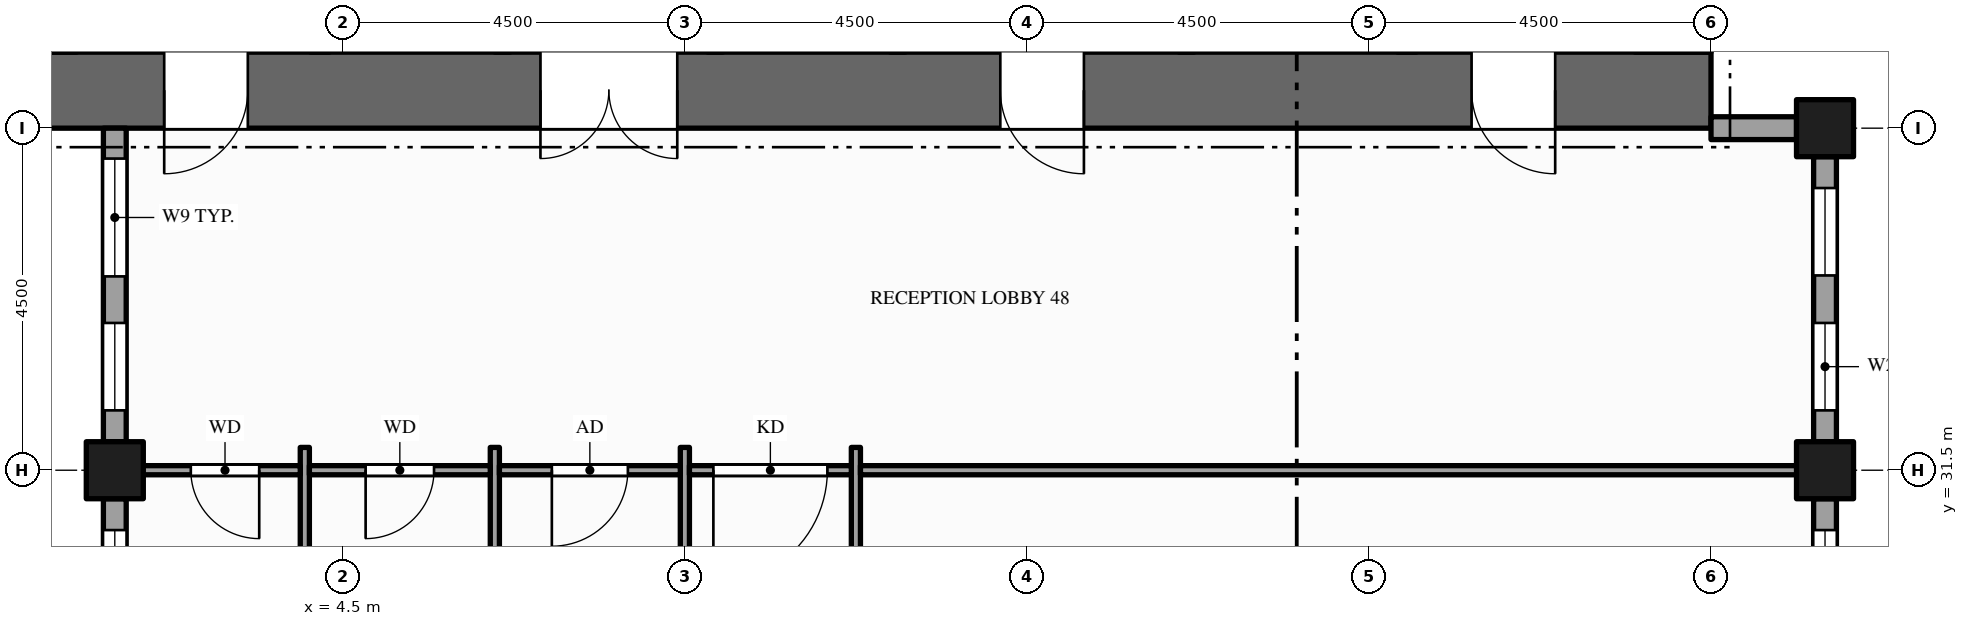
"""IFC4 building model, lengths in metres.
Left out: names, types, materials, properties, quantities, classifications, styles, units other than length and angle.
Written with IfcOpenShell. Run it as: python <this file> out.ifc"""

import sys

from ifc_helpers import new_model, si_unit, direction, frame, frame_2d, origin, origin_2d, place, context, subcontext, project, spatial, rectangle, hollow_rectangle, extrude, element, fill, save


model = new_model("IFC4")
c1 = context("Model", 3, precision=1e-05, world=origin(), true_north=direction((0.0, 1.0)))
c2 = subcontext(c1, "Body", "Model", "MODEL_VIEW")
j1 = project(units=[si_unit("LENGTHUNIT", "METRE"), si_unit("PLANEANGLEUNIT", "RADIAN")], contexts=[c1])
p1 = place(None, origin())
s1 = spatial("IfcSite", under=j1, at=p1, CompositionType="ELEMENT")
p2 = place(p1, origin())
s2 = spatial("IfcBuilding", under=s1, at=p2, CompositionType="ELEMENT")
p3 = place(p2, frame((0.0, 0.0, 195.0)))
s3 = spatial("IfcBuildingStorey", under=s2, at=p3, CompositionType="ELEMENT", Elevation=195.0)
p4 = place(p3, frame((0.0, 36.5, -0.15), z_axis=(0.0, 0.0, 1.0), x_axis=(1.0, 0.0, 0.0)))
e1 = element("IfcWall", 1, at=p4, inside=s3, PredefinedType="SHEAR", context=c2, shape_type="SweptSolid", body=[
    extrude(rectangle(XDim=22.5, YDim=1.0, at=frame_2d((11.25, 0.0))), origin(), (0.0, 0.0, 1.0), 4.0),
])
p5 = place(p4, frame((7.1, 0.0, 0.15)))
e2 = element("IfcOpeningElement", 2, at=p5, cuts=e1, PredefinedType="OPENING", context=c2, shape_type="SweptSolid", body=[
    extrude(rectangle(XDim=1.8, YDim=2.1, at=frame_2d((0.9, 1.05))), frame((0.0, 0.51, 0.0), z_axis=(0.0, -1.0, 0.0), x_axis=(1.0, 0.0, 0.0)), (0.0, 0.0, 1.0), 1.02),
])
p6 = place(p4, frame((13.15, 0.0, 0.15)))
e3 = element("IfcOpeningElement", 3, at=p6, cuts=e1, PredefinedType="OPENING", context=c2, shape_type="SweptSolid", body=[
    extrude(rectangle(XDim=1.1, YDim=2.1, at=frame_2d((0.55, 1.05))), frame((0.0, 0.51, 0.0), z_axis=(0.0, -1.0, 0.0), x_axis=(1.0, 0.0, 0.0)), (0.0, 0.0, 1.0), 1.02),
])
p7 = place(p4, frame((2.15, 0.0, 0.15)))
e4 = element("IfcOpeningElement", 4, at=p7, cuts=e1, PredefinedType="OPENING", context=c2, shape_type="SweptSolid", body=[
    extrude(rectangle(XDim=1.1, YDim=2.1, at=frame_2d((0.55, 1.05))), frame((0.0, 0.51, 0.0), z_axis=(0.0, -1.0, 0.0), x_axis=(1.0, 0.0, 0.0)), (0.0, 0.0, 1.0), 1.02),
])
p8 = place(p4, frame((19.35, 0.0, 0.15)))
e5 = element("IfcOpeningElement", 5, at=p8, cuts=e1, PredefinedType="OPENING", context=c2, shape_type="SweptSolid", body=[
    extrude(rectangle(XDim=1.1, YDim=2.1, at=frame_2d((0.55, 1.05))), frame((0.0, 0.51, 0.0), z_axis=(0.0, -1.0, 0.0), x_axis=(1.0, 0.0, 0.0)), (0.0, 0.0, 1.0), 1.02),
])
for number, where, z_axis, x_axis in (
    (6, (1.5, 31.5, -0.15), (0.0, 0.0, 1.0), (1.0, 0.0, 0.0)),
    (7, (24.0, 31.5, -0.15), (0.0, 0.0, 1.0), (1.0, 0.0, 0.0)),
    (8, (24.0, 36.0, -0.15), (0.0, 0.0, 1.0), (1.0, 0.0, 0.0)),
):
    element("IfcColumn", number, at=place(p3, frame(where, z_axis=z_axis, x_axis=x_axis)), inside=s3, PredefinedType="COLUMN", context=c2, shape_type="SweptSolid", body=[
        extrude(hollow_rectangle(XDim=0.75, YDim=0.75, WallThickness=0.036, at=origin_2d()), origin(), (0.0, 0.0, 1.0), 4.0),
    ])
p9 = place(p3, frame((24.0, 25.875, 0.0), z_axis=(0.0, 0.0, 1.0), x_axis=(0.0, 1.0, 0.0)))
e9 = element("IfcWall", 9, at=p9, inside=s3, PredefinedType="STANDARD", context=c2, shape_type="SweptSolid", body=[
    extrude(rectangle(XDim=5.25, YDim=0.3, at=frame_2d((2.625, 0.0))), origin(), (0.0, 0.0, 1.0), 3.157),
])
p10 = place(p9, frame((1.425, 0.0, 0.9)))
e10 = element("IfcOpeningElement", 10, at=p10, cuts=e9, PredefinedType="OPENING", context=c2, shape_type="SweptSolid", body=[
    extrude(rectangle(XDim=1.65, YDim=2.0, at=frame_2d((0.825, 1.0))), frame((0.0, 0.16, 0.0), z_axis=(0.0, -1.0, 0.0), x_axis=(1.0, 0.0, 0.0)), (0.0, 0.0, 1.0), 0.32),
])
p11 = place(p9, frame((3.688, 0.0, 0.9)))
e11 = element("IfcOpeningElement", 11, at=p11, cuts=e9, PredefinedType="OPENING", context=c2, shape_type="SweptSolid", body=[
    extrude(rectangle(XDim=1.15, YDim=2.0, at=frame_2d((0.575, 1.0))), frame((0.0, 0.16, 0.0), z_axis=(0.0, -1.0, 0.0), x_axis=(1.0, 0.0, 0.0)), (0.0, 0.0, 1.0), 0.32),
])
p12 = place(p3, frame((24.0, 31.875, 0.0), z_axis=(0.0, 0.0, 1.0), x_axis=(0.0, 1.0, 0.0)))
e12 = element("IfcWall", 12, at=p12, inside=s3, PredefinedType="STANDARD", context=c2, shape_type="SweptSolid", body=[
    extrude(rectangle(XDim=3.75, YDim=0.3, at=frame_2d((1.875, 0.0))), origin(), (0.0, 0.0, 1.0), 3.157),
])
p13 = place(p12, frame((0.413, 0.0, 0.9)))
e13 = element("IfcOpeningElement", 13, at=p13, cuts=e12, PredefinedType="OPENING", context=c2, shape_type="SweptSolid", body=[
    extrude(rectangle(XDim=1.15, YDim=2.0, at=frame_2d((0.575, 1.0))), frame((0.0, 0.16, 0.0), z_axis=(0.0, -1.0, 0.0), x_axis=(1.0, 0.0, 0.0)), (0.0, 0.0, 1.0), 0.32),
])
p14 = place(p12, frame((2.188, 0.0, 0.9)))
e14 = element("IfcOpeningElement", 14, at=p14, cuts=e12, PredefinedType="OPENING", context=c2, shape_type="SweptSolid", body=[
    extrude(rectangle(XDim=1.15, YDim=2.0, at=frame_2d((0.575, 1.0))), frame((0.0, 0.16, 0.0), z_axis=(0.0, -1.0, 0.0), x_axis=(1.0, 0.0, 0.0)), (0.0, 0.0, 1.0), 0.32),
])
p15 = place(p3, frame((23.625, 36.0, 0.0), z_axis=(0.0, 0.0, 1.0), x_axis=(-1.0, 0.0, 0.0)))
e15 = element("IfcWall", 15, at=p15, inside=s3, PredefinedType="STANDARD", context=c2, shape_type="SweptSolid", body=[
    extrude(rectangle(XDim=1.125, YDim=0.3, at=frame_2d((0.562, 0.0))), origin(), (0.0, 0.0, 1.0), 2.87),
])
p16 = place(p3, frame((1.5, 36.0, 0.0), z_axis=(0.0, 0.0, 1.0), x_axis=(0.0, -1.0, 0.0)))
e16 = element("IfcWall", 16, at=p16, inside=s3, PredefinedType="STANDARD", context=c2, shape_type="SweptSolid", body=[
    extrude(rectangle(XDim=4.125, YDim=0.3, at=frame_2d((2.062, 0.0))), origin(), (0.0, 0.0, 1.0), 3.157),
])
p17 = place(p16, frame((0.4, 0.0, 0.9)))
e17 = element("IfcOpeningElement", 17, at=p17, cuts=e16, PredefinedType="OPENING", context=c2, shape_type="SweptSolid", body=[
    extrude(rectangle(XDim=1.55, YDim=2.0, at=frame_2d((0.775, 1.0))), frame((0.0, 0.16, 0.0), z_axis=(0.0, -1.0, 0.0), x_axis=(1.0, 0.0, 0.0)), (0.0, 0.0, 1.0), 0.32),
])
p18 = place(p16, frame((2.562, 0.0, 0.9)))
e18 = element("IfcOpeningElement", 18, at=p18, cuts=e16, PredefinedType="OPENING", context=c2, shape_type="SweptSolid", body=[
    extrude(rectangle(XDim=1.15, YDim=2.0, at=frame_2d((0.575, 1.0))), frame((0.0, 0.16, 0.0), z_axis=(0.0, -1.0, 0.0), x_axis=(1.0, 0.0, 0.0)), (0.0, 0.0, 1.0), 0.32),
])
p19 = place(p3, frame((1.5, 31.125, 0.0), z_axis=(0.0, 0.0, 1.0), x_axis=(0.0, -1.0, 0.0)))
e19 = element("IfcWall", 19, at=p19, inside=s3, PredefinedType="STANDARD", context=c2, shape_type="SweptSolid", body=[
    extrude(rectangle(XDim=3.75, YDim=0.3, at=frame_2d((1.875, 0.0))), origin(), (0.0, 0.0, 1.0), 3.157),
])
p20 = place(p19, frame((0.413, 0.0, 0.9)))
e20 = element("IfcOpeningElement", 20, at=p20, cuts=e19, PredefinedType="OPENING", context=c2, shape_type="SweptSolid", body=[
    extrude(rectangle(XDim=1.15, YDim=2.0, at=frame_2d((0.575, 1.0))), frame((0.0, 0.16, 0.0), z_axis=(0.0, -1.0, 0.0), x_axis=(1.0, 0.0, 0.0)), (0.0, 0.0, 1.0), 0.32),
])
p21 = place(p19, frame((2.188, 0.0, 0.9)))
e21 = element("IfcOpeningElement", 21, at=p21, cuts=e19, PredefinedType="OPENING", context=c2, shape_type="SweptSolid", body=[
    extrude(rectangle(XDim=1.15, YDim=2.0, at=frame_2d((0.575, 1.0))), frame((0.0, 0.16, 0.0), z_axis=(0.0, -1.0, 0.0), x_axis=(1.0, 0.0, 0.0)), (0.0, 0.0, 1.0), 0.32),
])
for number, where, z_axis, x_axis in (
    (22, (4.0, 26.7, 0.0), (0.0, 0.0, 1.0), (0.0, 1.0, 0.0)),
    (23, (6.5, 26.7, 0.0), (0.0, 0.0, 1.0), (0.0, 1.0, 0.0)),
):
    element("IfcWall", number, at=place(p3, frame(where, z_axis=z_axis, x_axis=x_axis)), inside=s3, PredefinedType="PARTITIONING", context=c2, shape_type="SweptSolid", body=[
        extrude(rectangle(XDim=5.1, YDim=0.12, at=frame_2d((2.55, 0.0))), origin(), (0.0, 0.0, 1.0), 3.85),
    ])
p22 = place(p3, frame((9.0, 10.95, 0.0), z_axis=(0.0, 0.0, 1.0), x_axis=(0.0, 1.0, 0.0)))
e24 = element("IfcWall", 24, at=p22, inside=s3, PredefinedType="PARTITIONING", context=c2, shape_type="SweptSolid", body=[
    extrude(rectangle(XDim=20.85, YDim=0.12, at=frame_2d((10.425, 0.0))), origin(), (0.0, 0.0, 1.0), 2.6),
])
p23 = place(p22, frame((2.05, 0.0, 0.0)))
e25 = element("IfcOpeningElement", 25, at=p23, cuts=e24, PredefinedType="OPENING", context=c2, shape_type="SweptSolid", body=[
    extrude(rectangle(XDim=1.0, YDim=2.1, at=frame_2d((0.5, 1.05))), frame((0.0, 0.07, 0.0), z_axis=(0.0, -1.0, 0.0), x_axis=(1.0, 0.0, 0.0)), (0.0, 0.0, 1.0), 0.14),
])
p24 = place(p22, frame((6.55, 0.0, 0.0)))
e26 = element("IfcOpeningElement", 26, at=p24, cuts=e24, PredefinedType="OPENING", context=c2, shape_type="SweptSolid", body=[
    extrude(rectangle(XDim=1.0, YDim=2.1, at=frame_2d((0.5, 1.05))), frame((0.0, 0.07, 0.0), z_axis=(0.0, -1.0, 0.0), x_axis=(1.0, 0.0, 0.0)), (0.0, 0.0, 1.0), 0.14),
])
p25 = place(p22, frame((12.205, 0.0, 0.0)))
e27 = element("IfcOpeningElement", 27, at=p25, cuts=e24, PredefinedType="OPENING", context=c2, shape_type="SweptSolid", body=[
    extrude(rectangle(XDim=1.0, YDim=2.1, at=frame_2d((0.5, 1.05))), frame((0.0, 0.07, 0.0), z_axis=(0.0, -1.0, 0.0), x_axis=(1.0, 0.0, 0.0)), (0.0, 0.0, 1.0), 0.14),
])
p26 = place(p3, frame((11.25, 10.95, 0.0), z_axis=(0.0, 0.0, 1.0), x_axis=(0.0, 1.0, 0.0)))
e28 = element("IfcWall", 28, at=p26, inside=s3, PredefinedType="PARTITIONING", context=c2, shape_type="SweptSolid", body=[
    extrude(rectangle(XDim=20.85, YDim=0.12, at=frame_2d((10.425, 0.0))), origin(), (0.0, 0.0, 1.0), 2.6),
])
p27 = place(p26, frame((17.8, 0.0, 0.0)))
e29 = element("IfcOpeningElement", 29, at=p27, cuts=e28, PredefinedType="OPENING", context=c2, shape_type="SweptSolid", body=[
    extrude(rectangle(XDim=1.0, YDim=2.1, at=frame_2d((0.5, 1.05))), frame((0.0, 0.07, 0.0), z_axis=(0.0, -1.0, 0.0), x_axis=(1.0, 0.0, 0.0)), (0.0, 0.0, 1.0), 0.14),
])
p28 = place(p26, frame((4.2, 0.0, 0.0)))
e30 = element("IfcOpeningElement", 30, at=p28, cuts=e28, PredefinedType="OPENING", context=c2, shape_type="SweptSolid", body=[
    extrude(rectangle(XDim=1.2, YDim=2.1, at=frame_2d((0.6, 1.05))), frame((0.0, 0.07, 0.0), z_axis=(0.0, -1.0, 0.0), x_axis=(1.0, 0.0, 0.0)), (0.0, 0.0, 1.0), 0.14),
])
p29 = place(p3, frame((1.65, 31.5, 0.0), z_axis=(0.0, 0.0, 1.0), x_axis=(1.0, 0.0, 0.0)))
e31 = element("IfcWall", 31, at=p29, inside=s3, PredefinedType="PARTITIONING", context=c2, shape_type="SweptSolid", body=[
    extrude(rectangle(XDim=2.29, YDim=0.12, at=frame_2d((1.145, 0.0))), origin(), (0.0, 0.0, 1.0), 2.87),
])
p30 = place(p29, frame((0.85, 0.0, 0.0)))
e32 = element("IfcOpeningElement", 32, at=p30, cuts=e31, PredefinedType="OPENING", context=c2, shape_type="SweptSolid", body=[
    extrude(rectangle(XDim=0.9, YDim=2.1, at=frame_2d((0.45, 1.05))), frame((0.0, 0.07, 0.0), z_axis=(0.0, -1.0, 0.0), x_axis=(1.0, 0.0, 0.0)), (0.0, 0.0, 1.0), 0.14),
])
p31 = place(p3, frame((4.06, 31.5, 0.0), z_axis=(0.0, 0.0, 1.0), x_axis=(1.0, 0.0, 0.0)))
e33 = element("IfcWall", 33, at=p31, inside=s3, PredefinedType="PARTITIONING", context=c2, shape_type="SweptSolid", body=[
    extrude(rectangle(XDim=2.38, YDim=0.12, at=frame_2d((1.19, 0.0))), origin(), (0.0, 0.0, 1.0), 2.87),
])
p32 = place(p31, frame((0.74, 0.0, 0.0)))
e34 = element("IfcOpeningElement", 34, at=p32, cuts=e33, PredefinedType="OPENING", context=c2, shape_type="SweptSolid", body=[
    extrude(rectangle(XDim=0.9, YDim=2.1, at=frame_2d((0.45, 1.05))), frame((0.0, 0.07, 0.0), z_axis=(0.0, -1.0, 0.0), x_axis=(1.0, 0.0, 0.0)), (0.0, 0.0, 1.0), 0.14),
])
p33 = place(p3, frame((6.56, 31.5, 0.0), z_axis=(0.0, 0.0, 1.0), x_axis=(1.0, 0.0, 0.0)))
e35 = element("IfcWall", 35, at=p33, inside=s3, PredefinedType="PARTITIONING", context=c2, shape_type="SweptSolid", body=[
    extrude(rectangle(XDim=2.38, YDim=0.12, at=frame_2d((1.19, 0.0))), origin(), (0.0, 0.0, 1.0), 2.87),
])
p34 = place(p33, frame((0.69, 0.0, 0.0)))
e36 = element("IfcOpeningElement", 36, at=p34, cuts=e35, PredefinedType="OPENING", context=c2, shape_type="SweptSolid", body=[
    extrude(rectangle(XDim=1.0, YDim=2.1, at=frame_2d((0.5, 1.05))), frame((0.0, 0.07, 0.0), z_axis=(0.0, -1.0, 0.0), x_axis=(1.0, 0.0, 0.0)), (0.0, 0.0, 1.0), 0.14),
])
p35 = place(p3, frame((9.06, 31.5, 0.0), z_axis=(0.0, 0.0, 1.0), x_axis=(1.0, 0.0, 0.0)))
e37 = element("IfcWall", 37, at=p35, inside=s3, PredefinedType="PARTITIONING", context=c2, shape_type="SweptSolid", body=[
    extrude(rectangle(XDim=2.13, YDim=0.12, at=frame_2d((1.065, 0.0))), origin(), (0.0, 0.0, 1.0), 2.87),
])
p36 = place(p35, frame((0.315, 0.0, 0.0)))
e38 = element("IfcOpeningElement", 38, at=p36, cuts=e37, PredefinedType="OPENING", context=c2, shape_type="SweptSolid", body=[
    extrude(rectangle(XDim=1.5, YDim=2.1, at=frame_2d((0.75, 1.05))), frame((0.0, 0.07, 0.0), z_axis=(0.0, -1.0, 0.0), x_axis=(1.0, 0.0, 0.0)), (0.0, 0.0, 1.0), 0.14),
])
p37 = place(p3, frame((11.31, 31.5, 0.0), z_axis=(0.0, 0.0, 1.0), x_axis=(1.0, 0.0, 0.0)))
e39 = element("IfcWall", 39, at=p37, inside=s3, PredefinedType="PARTITIONING", context=c2, shape_type="SweptSolid", body=[
    extrude(rectangle(XDim=12.54, YDim=0.12, at=frame_2d((6.27, 0.0))), origin(), (0.0, 0.0, 1.0), 2.87),
])
p38 = place(p11, origin())
e40 = element("IfcWindow", 40, at=p38, inside=s3, PartitioningType="SINGLE_PANEL", PredefinedType="WINDOW", context=c2, shape_type="SweptSolid", body=[
    extrude(rectangle(XDim=1.15, YDim=2.0, at=frame_2d((0.575, 1.0))), frame((0.0, 0.03, 0.0), z_axis=(0.0, -1.0, 0.0), x_axis=(1.0, 0.0, 0.0)), (0.0, 0.0, 1.0), 0.06),
])
fill(e11, e40)
p39 = place(p13, origin())
e41 = element("IfcWindow", 41, at=p39, inside=s3, PartitioningType="SINGLE_PANEL", PredefinedType="WINDOW", context=c2, shape_type="SweptSolid", body=[
    extrude(rectangle(XDim=1.15, YDim=2.0, at=frame_2d((0.575, 1.0))), frame((0.0, 0.03, 0.0), z_axis=(0.0, -1.0, 0.0), x_axis=(1.0, 0.0, 0.0)), (0.0, 0.0, 1.0), 0.06),
])
fill(e13, e41)
p40 = place(p14, origin())
e42 = element("IfcWindow", 42, at=p40, inside=s3, PartitioningType="SINGLE_PANEL", PredefinedType="WINDOW", context=c2, shape_type="SweptSolid", body=[
    extrude(rectangle(XDim=1.15, YDim=2.0, at=frame_2d((0.575, 1.0))), frame((0.0, 0.03, 0.0), z_axis=(0.0, -1.0, 0.0), x_axis=(1.0, 0.0, 0.0)), (0.0, 0.0, 1.0), 0.06),
])
fill(e14, e42)
p41 = place(p17, origin())
e43 = element("IfcWindow", 43, at=p41, inside=s3, PartitioningType="SINGLE_PANEL", PredefinedType="WINDOW", context=c2, shape_type="SweptSolid", body=[
    extrude(rectangle(XDim=1.55, YDim=2.0, at=frame_2d((0.775, 1.0))), frame((0.0, 0.03, 0.0), z_axis=(0.0, -1.0, 0.0), x_axis=(1.0, 0.0, 0.0)), (0.0, 0.0, 1.0), 0.06),
])
fill(e17, e43)
p42 = place(p18, origin())
e44 = element("IfcWindow", 44, at=p42, inside=s3, PartitioningType="SINGLE_PANEL", PredefinedType="WINDOW", context=c2, shape_type="SweptSolid", body=[
    extrude(rectangle(XDim=1.15, YDim=2.0, at=frame_2d((0.575, 1.0))), frame((0.0, 0.03, 0.0), z_axis=(0.0, -1.0, 0.0), x_axis=(1.0, 0.0, 0.0)), (0.0, 0.0, 1.0), 0.06),
])
fill(e18, e44)
p43 = place(p20, origin())
e45 = element("IfcWindow", 45, at=p43, inside=s3, PartitioningType="SINGLE_PANEL", PredefinedType="WINDOW", context=c2, shape_type="SweptSolid", body=[
    extrude(rectangle(XDim=1.15, YDim=2.0, at=frame_2d((0.575, 1.0))), frame((0.0, 0.03, 0.0), z_axis=(0.0, -1.0, 0.0), x_axis=(1.0, 0.0, 0.0)), (0.0, 0.0, 1.0), 0.06),
])
fill(e20, e45)
p44 = place(p5, origin())
e46 = element("IfcDoor", 46, at=p44, inside=s3, OperationType="DOUBLE_DOOR_SINGLE_SWING", PredefinedType="DOOR", context=c2, shape_type="SweptSolid", body=[
    extrude(rectangle(XDim=1.8, YDim=2.1, at=frame_2d((0.9, 1.05))), frame((0.0, 0.025, 0.0), z_axis=(0.0, -1.0, 0.0), x_axis=(1.0, 0.0, 0.0)), (0.0, 0.0, 1.0), 0.05),
])
fill(e2, e46)
p45 = place(p6, origin())
e47 = element("IfcDoor", 47, at=p45, inside=s3, OperationType="SINGLE_SWING_RIGHT", PredefinedType="DOOR", context=c2, shape_type="SweptSolid", body=[
    extrude(rectangle(XDim=1.1, YDim=2.1, at=frame_2d((0.55, 1.05))), frame((0.0, 0.025, 0.0), z_axis=(0.0, -1.0, 0.0), x_axis=(1.0, 0.0, 0.0)), (0.0, 0.0, 1.0), 0.05),
])
fill(e3, e47)
p46 = place(p7, origin())
e48 = element("IfcDoor", 48, at=p46, inside=s3, OperationType="SINGLE_SWING_LEFT", PredefinedType="DOOR", context=c2, shape_type="SweptSolid", body=[
    extrude(rectangle(XDim=1.1, YDim=2.1, at=frame_2d((0.55, 1.05))), frame((0.0, 0.025, 0.0), z_axis=(0.0, -1.0, 0.0), x_axis=(1.0, 0.0, 0.0)), (0.0, 0.0, 1.0), 0.05),
])
fill(e4, e48)
p47 = place(p8, origin())
e49 = element("IfcDoor", 49, at=p47, inside=s3, OperationType="SINGLE_SWING_RIGHT", PredefinedType="DOOR", context=c2, shape_type="SweptSolid", body=[
    extrude(rectangle(XDim=1.1, YDim=2.1, at=frame_2d((0.55, 1.05))), frame((0.0, 0.025, 0.0), z_axis=(0.0, -1.0, 0.0), x_axis=(1.0, 0.0, 0.0)), (0.0, 0.0, 1.0), 0.05),
])
fill(e5, e49)
p48 = place(p36, origin())
e50 = element("IfcDoor", 50, at=p48, inside=s3, OperationType="SINGLE_SWING_LEFT", PredefinedType="DOOR", context=c2, shape_type="SweptSolid", body=[
    extrude(rectangle(XDim=1.5, YDim=2.1, at=frame_2d((0.75, 1.05))), frame((0.0, 0.025, 0.0), z_axis=(0.0, -1.0, 0.0), x_axis=(1.0, 0.0, 0.0)), (0.0, 0.0, 1.0), 0.05),
])
fill(e38, e50)
p49 = place(p30, origin())
e51 = element("IfcDoor", 51, at=p49, inside=s3, OperationType="SINGLE_SWING_RIGHT", PredefinedType="DOOR", context=c2, shape_type="SweptSolid", body=[
    extrude(rectangle(XDim=0.9, YDim=2.1, at=frame_2d((0.45, 1.05))), frame((0.0, 0.025, 0.0), z_axis=(0.0, -1.0, 0.0), x_axis=(1.0, 0.0, 0.0)), (0.0, 0.0, 1.0), 0.05),
])
fill(e32, e51)
p50 = place(p32, origin())
e52 = element("IfcDoor", 52, at=p50, inside=s3, OperationType="SINGLE_SWING_LEFT", PredefinedType="DOOR", context=c2, shape_type="SweptSolid", body=[
    extrude(rectangle(XDim=0.9, YDim=2.1, at=frame_2d((0.45, 1.05))), frame((0.0, 0.025, 0.0), z_axis=(0.0, -1.0, 0.0), x_axis=(1.0, 0.0, 0.0)), (0.0, 0.0, 1.0), 0.05),
])
fill(e34, e52)
p51 = place(p34, origin())
e53 = element("IfcDoor", 53, at=p51, inside=s3, OperationType="SINGLE_SWING_LEFT", PredefinedType="DOOR", context=c2, shape_type="SweptSolid", body=[
    extrude(rectangle(XDim=1.0, YDim=2.1, at=frame_2d((0.5, 1.05))), frame((0.0, 0.025, 0.0), z_axis=(0.0, -1.0, 0.0), x_axis=(1.0, 0.0, 0.0)), (0.0, 0.0, 1.0), 0.05),
])
fill(e36, e53)
save(model, sys.argv[1])
